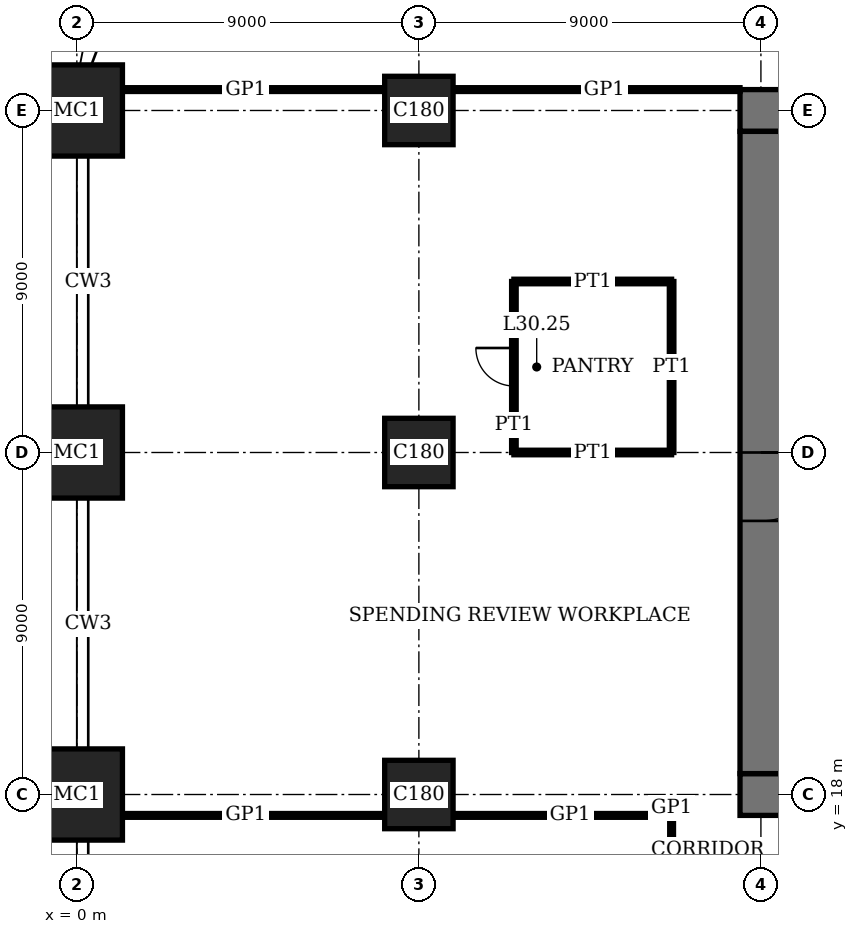
"""IFC4 building model, lengths in metres.
Left out: names, types, materials, properties, quantities, classifications, styles, units other than length and angle.
Written with IfcOpenShell. Run it as: python <this file> out.ifc"""

import sys

from ifc_helpers import new_model, si_unit, direction, frame, frame_2d, origin, origin_2d, place, context, subcontext, project, spatial, rectangle, extrude, element, fill, save


model = new_model("IFC4")
c1 = context("Model", 3, precision=1e-05, world=origin(), true_north=direction((0.0, 1.0)))
c2 = subcontext(c1, "Body", "Model", "MODEL_VIEW")
j1 = project(units=[si_unit("LENGTHUNIT", "METRE"), si_unit("PLANEANGLEUNIT", "RADIAN")], contexts=[c1])
p1 = place(None, origin())
s1 = spatial("IfcSite", under=j1, at=p1, CompositionType="ELEMENT")
p2 = place(p1, origin())
s2 = spatial("IfcBuilding", under=s1, at=p2, CompositionType="ELEMENT")
p3 = place(p2, frame((0.0, 0.0, 125.0)))
s3 = spatial("IfcBuildingStorey", under=s2, at=p3, CompositionType="ELEMENT", Elevation=125.0)
for number, where, z_axis, x_axis in (
    (1, (0.0, 18.0, 0.0), (0.0, 0.0, 1.0), (1.0, 0.0, 0.0)),
    (2, (0.0, 27.0, 0.0), (0.0, 0.0, 1.0), (1.0, 0.0, 0.0)),
    (3, (0.0, 36.0, 0.0), (0.0, 0.0, 1.0), (1.0, 0.0, 0.0)),
):
    element("IfcColumn", number, at=place(p3, frame(where, z_axis=z_axis, x_axis=x_axis)), inside=s3, PredefinedType="COLUMN", context=c2, shape_type="SweptSolid", body=[
        extrude(rectangle(XDim=2.4, YDim=2.4, at=origin_2d()), origin(), (0.0, 0.0, 1.0), 4.0),
    ])
for number, where, z_axis, x_axis in (
    (4, (9.0, 18.0, 0.0), (0.0, 0.0, 1.0), (1.0, 0.0, 0.0)),
    (5, (9.0, 27.0, 0.0), (0.0, 0.0, 1.0), (1.0, 0.0, 0.0)),
    (6, (9.0, 36.0, 0.0), (0.0, 0.0, 1.0), (1.0, 0.0, 0.0)),
):
    element("IfcColumn", number, at=place(p3, frame(where, z_axis=z_axis, x_axis=x_axis)), inside=s3, PredefinedType="COLUMN", context=c2, shape_type="SweptSolid", body=[
        extrude(rectangle(XDim=1.8, YDim=1.8, at=origin_2d()), origin(), (0.0, 0.0, 1.0), 4.0),
    ])
p4 = place(p3, frame((17.45, 18.0, 0.0), z_axis=(0.0, 0.0, 1.0), x_axis=(1.0, 0.0, 0.0)))
e7 = element("IfcWall", 7, at=p4, inside=s3, PredefinedType="SHEAR", context=c2, shape_type="SweptSolid", body=[
    extrude(rectangle(XDim=28.1, YDim=1.1, at=frame_2d((14.05, 0.0))), origin(), (0.0, 0.0, 1.0), 4.0),
])
p5 = place(p4, frame((11.55, 0.0, 0.0)))
e8 = element("IfcOpeningElement", 8, at=p5, cuts=e7, PredefinedType="OPENING", context=c2, shape_type="SweptSolid", body=[
    extrude(rectangle(XDim=1.0, YDim=2.4, at=frame_2d((0.5, 1.2))), frame((0.0, 0.56, 0.0), z_axis=(0.0, -1.0, 0.0), x_axis=(1.0, 0.0, 0.0)), (0.0, 0.0, 1.0), 1.12),
])
p6 = place(p4, frame((16.55, 0.0, 0.0)))
e9 = element("IfcOpeningElement", 9, at=p6, cuts=e7, PredefinedType="OPENING", context=c2, shape_type="SweptSolid", body=[
    extrude(rectangle(XDim=1.0, YDim=2.4, at=frame_2d((0.5, 1.2))), frame((0.0, 0.56, 0.0), z_axis=(0.0, -1.0, 0.0), x_axis=(1.0, 0.0, 0.0)), (0.0, 0.0, 1.0), 1.12),
])
p7 = place(p4, frame((20.0, 0.0, 0.0)))
e10 = element("IfcOpeningElement", 10, at=p7, cuts=e7, PredefinedType="OPENING", context=c2, shape_type="SweptSolid", body=[
    extrude(rectangle(XDim=1.1, YDim=2.4, at=frame_2d((0.55, 1.2))), frame((0.0, 0.56, 0.0), z_axis=(0.0, -1.0, 0.0), x_axis=(1.0, 0.0, 0.0)), (0.0, 0.0, 1.0), 1.12),
])
p8 = place(p4, frame((24.05, 0.0, 0.0)))
e11 = element("IfcOpeningElement", 11, at=p8, cuts=e7, PredefinedType="OPENING", context=c2, shape_type="SweptSolid", body=[
    extrude(rectangle(XDim=1.0, YDim=2.4, at=frame_2d((0.5, 1.2))), frame((0.0, 0.56, 0.0), z_axis=(0.0, -1.0, 0.0), x_axis=(1.0, 0.0, 0.0)), (0.0, 0.0, 1.0), 1.12),
])
p9 = place(p3, frame((45.55, 36.0, 0.0), z_axis=(0.0, 0.0, 1.0), x_axis=(-1.0, 0.0, 0.0)))
e12 = element("IfcWall", 12, at=p9, inside=s3, PredefinedType="SHEAR", context=c2, shape_type="SweptSolid", body=[
    extrude(rectangle(XDim=28.1, YDim=1.1, at=frame_2d((14.05, 0.0))), origin(), (0.0, 0.0, 1.0), 4.0),
])
p10 = place(p9, frame((11.55, 0.0, 0.0)))
e13 = element("IfcOpeningElement", 13, at=p10, cuts=e12, PredefinedType="OPENING", context=c2, shape_type="SweptSolid", body=[
    extrude(rectangle(XDim=1.0, YDim=2.4, at=frame_2d((0.5, 1.2))), frame((0.0, 0.56, 0.0), z_axis=(0.0, -1.0, 0.0), x_axis=(1.0, 0.0, 0.0)), (0.0, 0.0, 1.0), 1.12),
])
p11 = place(p9, frame((16.55, 0.0, 0.0)))
e14 = element("IfcOpeningElement", 14, at=p11, cuts=e12, PredefinedType="OPENING", context=c2, shape_type="SweptSolid", body=[
    extrude(rectangle(XDim=1.0, YDim=2.4, at=frame_2d((0.5, 1.2))), frame((0.0, 0.56, 0.0), z_axis=(0.0, -1.0, 0.0), x_axis=(1.0, 0.0, 0.0)), (0.0, 0.0, 1.0), 1.12),
])
p12 = place(p9, frame((20.0, 0.0, 0.0)))
e15 = element("IfcOpeningElement", 15, at=p12, cuts=e12, PredefinedType="OPENING", context=c2, shape_type="SweptSolid", body=[
    extrude(rectangle(XDim=1.1, YDim=2.4, at=frame_2d((0.55, 1.2))), frame((0.0, 0.56, 0.0), z_axis=(0.0, -1.0, 0.0), x_axis=(1.0, 0.0, 0.0)), (0.0, 0.0, 1.0), 1.12),
])
p13 = place(p9, frame((24.05, 0.0, 0.0)))
e16 = element("IfcOpeningElement", 16, at=p13, cuts=e12, PredefinedType="OPENING", context=c2, shape_type="SweptSolid", body=[
    extrude(rectangle(XDim=1.0, YDim=2.4, at=frame_2d((0.5, 1.2))), frame((0.0, 0.56, 0.0), z_axis=(0.0, -1.0, 0.0), x_axis=(1.0, 0.0, 0.0)), (0.0, 0.0, 1.0), 1.12),
])
p14 = place(p3, frame((18.0, 35.45, 0.0), z_axis=(0.0, 0.0, 1.0), x_axis=(0.0, -1.0, 0.0)))
e17 = element("IfcWall", 17, at=p14, inside=s3, PredefinedType="SHEAR", context=c2, shape_type="SweptSolid", body=[
    extrude(rectangle(XDim=16.9, YDim=1.1, at=frame_2d((8.45, 0.0))), origin(), (0.0, 0.0, 1.0), 4.0),
])
p15 = place(p14, frame((8.45, 0.0, 0.0)))
e18 = element("IfcOpeningElement", 18, at=p15, cuts=e17, PredefinedType="OPENING", context=c2, shape_type="SweptSolid", body=[
    extrude(rectangle(XDim=1.8, YDim=2.4, at=frame_2d((0.9, 1.2))), frame((0.0, 0.56, 0.0), z_axis=(0.0, -1.0, 0.0), x_axis=(1.0, 0.0, 0.0)), (0.0, 0.0, 1.0), 1.12),
])
p16 = place(p3, frame((1.2, 17.45, 0.0), z_axis=(0.0, 0.0, 1.0), x_axis=(1.0, 0.0, 0.0)))
e19 = element("IfcWall", 19, at=p16, inside=s3, PredefinedType="PARTITIONING", context=c2, shape_type="SweptSolid", body=[
    extrude(rectangle(XDim=6.9, YDim=0.1, at=frame_2d((3.45, 0.0))), origin(), (0.0, 0.0, 1.0), 3.75),
])
p17 = place(p3, frame((9.9, 17.45, 0.0), z_axis=(0.0, 0.0, 1.0), x_axis=(1.0, 0.0, 0.0)))
e20 = element("IfcWall", 20, at=p17, inside=s3, PredefinedType="PARTITIONING", context=c2, shape_type="SweptSolid", body=[
    extrude(rectangle(XDim=5.75, YDim=0.1, at=frame_2d((2.875, 0.0))), origin(), (0.0, 0.0, 1.0), 3.75),
])
p18 = place(p3, frame((11.5, 27.0, 0.0), z_axis=(0.0, 0.0, 1.0), x_axis=(1.0, 0.0, 0.0)))
e21 = element("IfcWall", 21, at=p18, inside=s3, PredefinedType="PARTITIONING", context=c2, shape_type="SweptSolid", body=[
    extrude(rectangle(XDim=4.15, YDim=0.12, at=frame_2d((2.075, 0.0))), origin(), (0.0, 0.0, 1.0), 3.05),
])
p19 = place(p3, frame((11.5, 31.5, 0.0), z_axis=(0.0, 0.0, 1.0), x_axis=(1.0, 0.0, 0.0)))
e22 = element("IfcWall", 22, at=p19, inside=s3, PredefinedType="PARTITIONING", context=c2, shape_type="SweptSolid", body=[
    extrude(rectangle(XDim=4.15, YDim=0.12, at=frame_2d((2.075, 0.0))), origin(), (0.0, 0.0, 1.0), 3.1),
])
p20 = place(p3, frame((1.2, 36.55, 0.0), z_axis=(0.0, 0.0, 1.0), x_axis=(1.0, 0.0, 0.0)))
e23 = element("IfcWall", 23, at=p20, inside=s3, PredefinedType="PARTITIONING", context=c2, shape_type="SweptSolid", body=[
    extrude(rectangle(XDim=6.9, YDim=0.1, at=frame_2d((3.45, 0.0))), origin(), (0.0, 0.0, 1.0), 3.75),
])
p21 = place(p3, frame((9.9, 36.55, 0.0), z_axis=(0.0, 0.0, 1.0), x_axis=(1.0, 0.0, 0.0)))
e24 = element("IfcWall", 24, at=p21, inside=s3, PredefinedType="PARTITIONING", context=c2, shape_type="SweptSolid", body=[
    extrude(rectangle(XDim=7.55, YDim=0.1, at=frame_2d((3.775, 0.0))), origin(), (0.0, 0.0, 1.0), 3.75),
])
p22 = place(p3, frame((11.5, 27.0, 0.0), z_axis=(0.0, 0.0, 1.0), x_axis=(0.0, 1.0, 0.0)))
e25 = element("IfcWall", 25, at=p22, inside=s3, PredefinedType="PARTITIONING", context=c2, shape_type="SweptSolid", body=[
    extrude(rectangle(XDim=4.5, YDim=0.12, at=frame_2d((2.25, 0.0))), origin(), (0.0, 0.0, 1.0), 3.75),
])
p23 = place(p22, frame((1.75, 0.0, 0.0)))
e26 = element("IfcOpeningElement", 26, at=p23, cuts=e25, PredefinedType="OPENING", context=c2, shape_type="SweptSolid", body=[
    extrude(rectangle(XDim=1.0, YDim=2.4, at=frame_2d((0.5, 1.2))), frame((0.0, 0.07, 0.0), z_axis=(0.0, -1.0, 0.0), x_axis=(1.0, 0.0, 0.0)), (0.0, 0.0, 1.0), 0.14),
])
p24 = place(p3, frame((15.65, 27.0, 0.0), z_axis=(0.0, 0.0, 1.0), x_axis=(0.0, 1.0, 0.0)))
e27 = element("IfcWall", 27, at=p24, inside=s3, PredefinedType="PARTITIONING", context=c2, shape_type="SweptSolid", body=[
    extrude(rectangle(XDim=4.5, YDim=0.12, at=frame_2d((2.25, 0.0))), origin(), (0.0, 0.0, 1.0), 3.75),
])
p25 = place(p3, frame((15.65, 15.65, 0.0), z_axis=(0.0, 0.0, 1.0), x_axis=(0.0, 1.0, 0.0)))
e28 = element("IfcWall", 28, at=p25, inside=s3, PredefinedType="PARTITIONING", context=c2, shape_type="SweptSolid", body=[
    extrude(rectangle(XDim=1.8, YDim=0.1, at=frame_2d((0.9, 0.0))), origin(), (0.0, 0.0, 1.0), 3.75),
])
p26 = place(p15, origin())
e29 = element("IfcDoor", 29, at=p26, inside=s3, OperationType="DOUBLE_DOOR_DOUBLE_SWING", PredefinedType="DOOR", context=c2, shape_type="SweptSolid", body=[
    extrude(rectangle(XDim=1.8, YDim=2.4, at=frame_2d((0.9, 1.2))), frame((0.0, 0.03, 0.0), z_axis=(0.0, -1.0, 0.0), x_axis=(1.0, 0.0, 0.0)), (0.0, 0.0, 1.0), 0.06),
    extrude(rectangle(XDim=0.04, YDim=2.4, at=frame_2d((0.02, 1.2))), frame((0.0, 0.55, 0.0), z_axis=(0.0, -1.0, 0.0), x_axis=(1.0, 0.0, 0.0)), (0.0, 0.0, 1.0), 1.1),
    extrude(rectangle(XDim=0.04, YDim=2.4, at=frame_2d((1.78, 1.2))), frame((0.0, 0.55, 0.0), z_axis=(0.0, -1.0, 0.0), x_axis=(1.0, 0.0, 0.0)), (0.0, 0.0, 1.0), 1.1),
    extrude(rectangle(XDim=1.8, YDim=0.04, at=frame_2d((0.9, 2.38))), frame((0.0, 0.55, 0.0), z_axis=(0.0, -1.0, 0.0), x_axis=(1.0, 0.0, 0.0)), (0.0, 0.0, 1.0), 1.1),
])
fill(e18, e29)
p27 = place(p23, origin())
e30 = element("IfcDoor", 30, at=p27, inside=s3, OperationType="SINGLE_SWING_LEFT", PredefinedType="DOOR", context=c2, shape_type="SweptSolid", body=[
    extrude(rectangle(XDim=1.0, YDim=2.4, at=frame_2d((0.5, 1.2))), frame((0.0, 0.025, 0.0), z_axis=(0.0, -1.0, 0.0), x_axis=(1.0, 0.0, 0.0)), (0.0, 0.0, 1.0), 0.05),
])
fill(e26, e30)
save(model, sys.argv[1])
